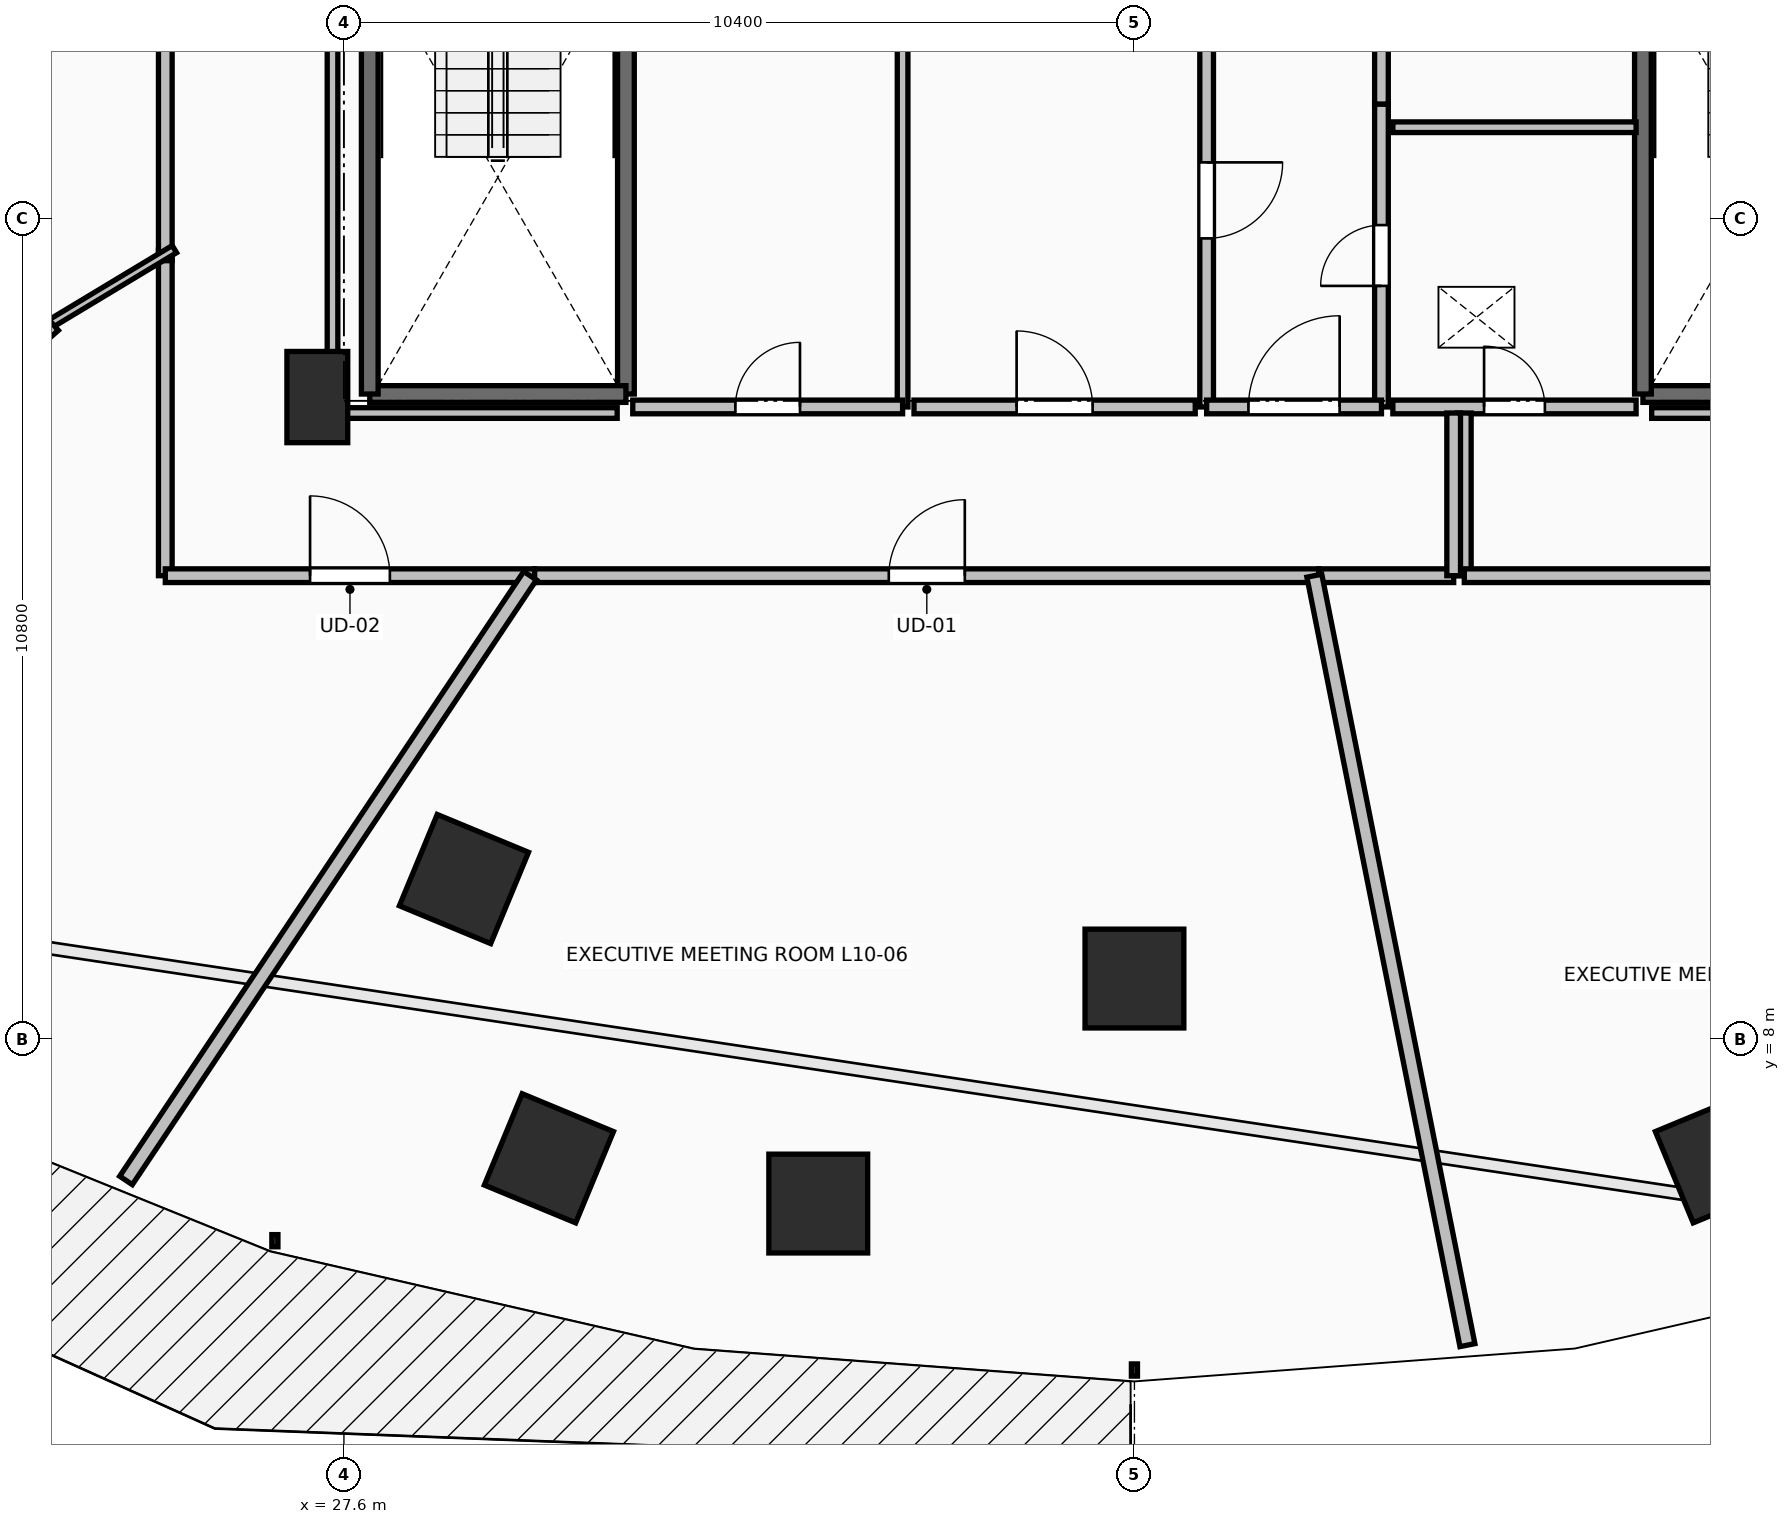
"""IFC4 building model, lengths in metres.
Left out: names, types, materials, properties, quantities, classifications, styles, units other than length and angle.
Written with IfcOpenShell. Run it as: python <this file> out.ifc"""

import sys

from ifc_helpers import new_model, si_unit, direction, frame, frame_2d, origin, origin_2d, place, context, subcontext, project, spatial, rectangle, extrude, element, fill, save


model = new_model("IFC4")
c1 = context("Model", 3, precision=1e-05, world=origin(), true_north=direction((0.0, 1.0)))
c2 = subcontext(c1, "Body", "Model", "MODEL_VIEW")
j1 = project(units=[si_unit("LENGTHUNIT", "METRE"), si_unit("PLANEANGLEUNIT", "RADIAN")], contexts=[c1])
p1 = place(None, origin())
s1 = spatial("IfcSite", under=j1, at=p1, CompositionType="ELEMENT")
p2 = place(p1, origin())
s2 = spatial("IfcBuilding", under=s1, at=p2, CompositionType="ELEMENT")
p3 = place(p2, frame((0.0, 0.0, 41.5)))
s3 = spatial("IfcBuildingStorey", under=s2, at=p3, CompositionType="ELEMENT", Elevation=41.5)
for number, where, z_axis, x_axis in (
    (1, (29.179, 10.109, 0.0), (0.0, 0.0, 1.0), (-0.383, -0.924, 0.0)),
    (2, (38.0, 8.8, 0.0), (0.0, 0.0, 1.0), (0.0, -1.0, 0.0)),
    (3, (30.297, 6.435, 0.0), (0.0, 0.0, 1.0), (-0.383, -0.924, 0.0)),
    (4, (33.84, 5.84, 0.0), (0.0, 0.0, 1.0), (0.0, -1.0, 0.0)),
    (5, (45.703, 6.435, 0.0), (0.0, 0.0, 1.0), (0.383, -0.924, 0.0)),
):
    element("IfcColumn", number, at=place(p3, frame(where, z_axis=z_axis, x_axis=x_axis)), inside=s3, PredefinedType="COLUMN", context=c2, shape_type="SweptSolid", body=[
        extrude(rectangle(XDim=1.3, YDim=1.3, at=origin_2d()), origin(), (0.0, 0.0, 1.0), 3.5),
    ])
p4 = place(p3, frame((27.25, 16.45, 0.0), z_axis=(0.0, 0.0, 1.0), x_axis=(1.0, 0.0, 0.0)))
e6 = element("IfcColumn", 6, at=p4, inside=s3, PredefinedType="PILASTER", context=c2, shape_type="SweptSolid", body=[
    extrude(rectangle(XDim=0.8, YDim=1.2, at=origin_2d()), origin(), (0.0, 0.0, 1.0), 3.5),
])
p5 = place(p3, frame((31.31, 23.91, 0.0), z_axis=(0.0, 0.0, 1.0), x_axis=(0.0, -1.0, 0.0)))
e7 = element("IfcWall", 7, at=p5, inside=s3, PredefinedType="SOLIDWALL", context=c2, shape_type="SweptSolid", body=[
    extrude(rectangle(XDim=7.42, YDim=0.22, at=frame_2d((3.71, 0.0))), origin(), (0.0, 0.0, 1.0), 3.24),
])
p6 = place(p3, frame((31.31, 16.49, 0.0), z_axis=(0.0, 0.0, 1.0), x_axis=(-1.0, 0.0, 0.0)))
e8 = element("IfcWall", 8, at=p6, inside=s3, PredefinedType="SOLIDWALL", context=c2, shape_type="SweptSolid", body=[
    extrude(rectangle(XDim=3.37, YDim=0.22, at=frame_2d((1.685, 0.0))), origin(), (0.0, 0.0, 1.0), 3.24),
])
p7 = place(p3, frame((27.94, 16.49, 0.0), z_axis=(0.0, 0.0, 1.0), x_axis=(0.0, 1.0, 0.0)))
e9 = element("IfcWall", 9, at=p7, inside=s3, PredefinedType="SOLIDWALL", context=c2, shape_type="SweptSolid", body=[
    extrude(rectangle(XDim=7.42, YDim=0.22, at=frame_2d((3.71, 0.0))), origin(), (0.0, 0.0, 1.0), 3.24),
])
p8 = place(p3, frame((48.06, 16.49, 0.0), z_axis=(0.0, 0.0, 1.0), x_axis=(-1.0, 0.0, 0.0)))
e10 = element("IfcWall", 10, at=p8, inside=s3, PredefinedType="SOLIDWALL", context=c2, shape_type="SweptSolid", body=[
    extrude(rectangle(XDim=3.37, YDim=0.22, at=frame_2d((1.685, 0.0))), origin(), (0.0, 0.0, 1.0), 3.24),
])
p9 = place(p3, frame((44.69, 16.49, 0.0), z_axis=(0.0, 0.0, 1.0), x_axis=(0.0, 1.0, 0.0)))
e11 = element("IfcWall", 11, at=p9, inside=s3, PredefinedType="SOLIDWALL", context=c2, shape_type="SweptSolid", body=[
    extrude(rectangle(XDim=7.42, YDim=0.22, at=frame_2d((3.71, 0.0))), origin(), (0.0, 0.0, 1.0), 3.24),
])
p10 = place(p3, frame((41.25, 16.32, 0.0), z_axis=(0.0, 0.0, 1.0), x_axis=(0.0, 1.0, 0.0)))
e12 = element("IfcWall", 12, at=p10, inside=s3, PredefinedType="PARTITIONING", context=c2, shape_type="SweptSolid", body=[
    extrude(rectangle(XDim=3.985, YDim=0.18, at=frame_2d((1.992, 0.0))), origin(), (0.0, 0.0, 1.0), 3.24),
])
p11 = place(p10, frame((1.593, 0.0, 0.0)))
e13 = element("IfcOpeningElement", 13, at=p11, cuts=e12, PredefinedType="OPENING", context=c2, shape_type="SweptSolid", body=[
    extrude(rectangle(XDim=0.8, YDim=2.05, at=frame_2d((0.4, 1.025))), frame((0.0, 0.105, 0.0), z_axis=(0.0, -1.0, 0.0), x_axis=(1.0, 0.0, 0.0)), (0.0, 0.0, 1.0), 0.21),
])
p12 = place(p3, frame((41.25, 20.305, 0.0), z_axis=(0.0, 0.0, 1.0), x_axis=(0.0, 1.0, 0.0)))
e14 = element("IfcWall", 14, at=p12, inside=s3, PredefinedType="PARTITIONING", context=c2, shape_type="SweptSolid", body=[
    extrude(rectangle(XDim=3.895, YDim=0.18, at=frame_2d((1.948, 0.0))), origin(), (0.0, 0.0, 1.0), 3.24),
])
p13 = place(p12, frame((1.448, 0.0, 0.0)))
e15 = element("IfcOpeningElement", 15, at=p13, cuts=e14, PredefinedType="OPENING", context=c2, shape_type="SweptSolid", body=[
    extrude(rectangle(XDim=1.0, YDim=2.15, at=frame_2d((0.5, 1.075))), frame((0.0, 0.105, 0.0), z_axis=(0.0, -1.0, 0.0), x_axis=(1.0, 0.0, 0.0)), (0.0, 0.0, 1.0), 0.21),
])
p14 = place(p3, frame((38.95, 21.755, 0.0), z_axis=(0.0, 0.0, 1.0), x_axis=(0.0, -1.0, 0.0)))
e16 = element("IfcWall", 16, at=p14, inside=s3, PredefinedType="PARTITIONING", context=c2, shape_type="SweptSolid", body=[
    extrude(rectangle(XDim=5.435, YDim=0.18, at=frame_2d((2.717, 0.0))), origin(), (0.0, 0.0, 1.0), 3.24),
])
p15 = place(p14, frame((2.218, 0.0, 0.0)))
e17 = element("IfcOpeningElement", 17, at=p15, cuts=e16, PredefinedType="OPENING", context=c2, shape_type="SweptSolid", body=[
    extrude(rectangle(XDim=1.0, YDim=2.15, at=frame_2d((0.5, 1.075))), frame((0.0, 0.105, 0.0), z_axis=(0.0, -1.0, 0.0), x_axis=(1.0, 0.0, 0.0)), (0.0, 0.0, 1.0), 0.21),
])
p16 = place(p3, frame((38.95, 16.32, 0.0), z_axis=(0.0, 0.0, 1.0), x_axis=(1.0, 0.0, 0.0)))
e18 = element("IfcWall", 18, at=p16, inside=s3, PredefinedType="PARTITIONING", context=c2, shape_type="SweptSolid", body=[
    extrude(rectangle(XDim=2.3, YDim=0.18, at=frame_2d((1.15, 0.0))), origin(), (0.0, 0.0, 1.0), 3.24),
])
p17 = place(p16, frame((0.55, 0.0, 0.0)))
e19 = element("IfcOpeningElement", 19, at=p17, cuts=e18, PredefinedType="OPENING", context=c2, shape_type="SweptSolid", body=[
    extrude(rectangle(XDim=1.2, YDim=2.15, at=frame_2d((0.6, 1.075))), frame((0.0, 0.105, 0.0), z_axis=(0.0, -1.0, 0.0), x_axis=(1.0, 0.0, 0.0)), (0.0, 0.0, 1.0), 0.21),
])
p18 = place(p3, frame((44.6, 20.0, 0.0), z_axis=(0.0, 0.0, 1.0), x_axis=(-1.0, 0.0, 0.0)))
e20 = element("IfcWall", 20, at=p18, inside=s3, PredefinedType="PARTITIONING", context=c2, shape_type="SweptSolid", body=[
    extrude(rectangle(XDim=3.2, YDim=0.14, at=frame_2d((1.6, 0.0))), origin(), (0.0, 0.0, 1.0), 3.24),
])
p19 = place(p3, frame((41.4, 16.32, 0.0), z_axis=(0.0, 0.0, 1.0), x_axis=(1.0, 0.0, 0.0)))
e21 = element("IfcWall", 21, at=p19, inside=s3, PredefinedType="PARTITIONING", context=c2, shape_type="SweptSolid", body=[
    extrude(rectangle(XDim=3.2, YDim=0.18, at=frame_2d((1.6, 0.0))), origin(), (0.0, 0.0, 1.0), 3.24),
])
p20 = place(p19, frame((1.2, 0.0, 0.0)))
e22 = element("IfcOpeningElement", 22, at=p20, cuts=e21, PredefinedType="OPENING", context=c2, shape_type="SweptSolid", body=[
    extrude(rectangle(XDim=0.8, YDim=2.05, at=frame_2d((0.4, 1.025))), frame((0.0, 0.105, 0.0), z_axis=(0.0, -1.0, 0.0), x_axis=(1.0, 0.0, 0.0)), (0.0, 0.0, 1.0), 0.21),
])
p21 = place(p3, frame((34.95, 16.32, 0.0), z_axis=(0.0, 0.0, 1.0), x_axis=(0.0, 1.0, 0.0)))
e23 = element("IfcWall", 23, at=p21, inside=s3, PredefinedType="PARTITIONING", context=c2, shape_type="SweptSolid", body=[
    extrude(rectangle(XDim=5.13, YDim=0.14, at=frame_2d((2.565, 0.0))), origin(), (0.0, 0.0, 1.0), 3.24),
])
p22 = place(p3, frame((31.4, 16.32, 0.0), z_axis=(0.0, 0.0, 1.0), x_axis=(1.0, 0.0, 0.0)))
e24 = element("IfcWall", 24, at=p22, inside=s3, PredefinedType="PARTITIONING", context=c2, shape_type="SweptSolid", body=[
    extrude(rectangle(XDim=3.55, YDim=0.18, at=frame_2d((1.775, 0.0))), origin(), (0.0, 0.0, 1.0), 3.24),
])
p23 = place(p22, frame((1.35, 0.0, 0.0)))
e25 = element("IfcOpeningElement", 25, at=p23, cuts=e24, PredefinedType="OPENING", context=c2, shape_type="SweptSolid", body=[
    extrude(rectangle(XDim=0.85, YDim=2.1, at=frame_2d((0.425, 1.05))), frame((0.0, 0.105, 0.0), z_axis=(0.0, -1.0, 0.0), x_axis=(1.0, 0.0, 0.0)), (0.0, 0.0, 1.0), 0.21),
])
p24 = place(p3, frame((35.1, 16.32, 0.0), z_axis=(0.0, 0.0, 1.0), x_axis=(1.0, 0.0, 0.0)))
e26 = element("IfcWall", 26, at=p24, inside=s3, PredefinedType="PARTITIONING", context=c2, shape_type="SweptSolid", body=[
    extrude(rectangle(XDim=3.7, YDim=0.18, at=frame_2d((1.85, 0.0))), origin(), (0.0, 0.0, 1.0), 3.24),
])
p25 = place(p24, frame((1.35, 0.0, 0.0)))
e27 = element("IfcOpeningElement", 27, at=p25, cuts=e26, PredefinedType="OPENING", context=c2, shape_type="SweptSolid", body=[
    extrude(rectangle(XDim=1.0, YDim=2.15, at=frame_2d((0.5, 1.075))), frame((0.0, 0.105, 0.0), z_axis=(0.0, -1.0, 0.0), x_axis=(1.0, 0.0, 0.0)), (0.0, 0.0, 1.0), 0.21),
])
p26 = place(p3, frame((25.25, 18.384, 0.0), z_axis=(0.0, 0.0, 1.0), x_axis=(0.0, -1.0, 0.0)))
e28 = element("IfcWall", 28, at=p26, inside=s3, PredefinedType="PARTITIONING", context=c2, shape_type="SweptSolid", body=[
    extrude(rectangle(XDim=4.284, YDim=0.18, at=frame_2d((2.142, 0.0))), origin(), (0.0, 0.0, 1.0), 2.432),
])
p27 = place(p3, frame((25.25, 14.1, 0.0), z_axis=(0.0, 0.0, 1.0), x_axis=(1.0, 0.0, 0.0)))
e29 = element("IfcWall", 29, at=p27, inside=s3, PredefinedType="PARTITIONING", context=c2, shape_type="SweptSolid", body=[
    extrude(rectangle(XDim=4.859, YDim=0.18, at=frame_2d((2.429, 0.0))), origin(), (0.0, 0.0, 1.0), 2.432),
])
p28 = place(p27, frame((1.905, 0.0, 0.0)))
e30 = element("IfcOpeningElement", 30, at=p28, cuts=e29, PredefinedType="OPENING", context=c2, shape_type="SweptSolid", body=[
    extrude(rectangle(XDim=1.05, YDim=2.2, at=frame_2d((0.525, 1.1))), frame((0.0, 0.105, 0.0), z_axis=(0.0, -1.0, 0.0), x_axis=(1.0, 0.0, 0.0)), (0.0, 0.0, 1.0), 0.21),
])
p29 = place(p3, frame((25.25, 23.543, 0.0), z_axis=(0.0, 0.0, 1.0), x_axis=(0.0, -1.0, 0.0)))
e31 = element("IfcWall", 31, at=p29, inside=s3, PredefinedType="PARTITIONING", context=c2, shape_type="SweptSolid", body=[
    extrude(rectangle(XDim=5.299, YDim=0.18, at=frame_2d((2.649, 0.0))), origin(), (0.0, 0.0, 1.0), 3.24),
])
p30 = place(p3, frame((30.109, 14.1, 0.0), z_axis=(0.0, 0.0, 1.0), x_axis=(1.0, 0.0, 0.0)))
e32 = element("IfcWall", 32, at=p30, inside=s3, PredefinedType="PARTITIONING", context=c2, shape_type="SweptSolid", body=[
    extrude(rectangle(XDim=10.319, YDim=0.18, at=frame_2d((5.16, 0.0))), origin(), (0.0, 0.0, 1.0), 3.24),
])
p31 = place(p30, frame((4.659, 0.0, 0.0)))
e33 = element("IfcOpeningElement", 33, at=p31, cuts=e32, PredefinedType="OPENING", context=c2, shape_type="SweptSolid", body=[
    extrude(rectangle(XDim=1.0, YDim=2.15, at=frame_2d((0.5, 1.075))), frame((0.0, 0.105, 0.0), z_axis=(0.0, -1.0, 0.0), x_axis=(1.0, 0.0, 0.0)), (0.0, 0.0, 1.0), 0.21),
])
p32 = place(p3, frame((42.34, 16.24, 0.0), z_axis=(0.0, 0.0, 1.0), x_axis=(0.0, -1.0, 0.0)))
e34 = element("IfcWall", 34, at=p32, inside=s3, PredefinedType="PARTITIONING", context=c2, shape_type="SweptSolid", body=[
    extrude(rectangle(XDim=2.14, YDim=0.18, at=frame_2d((1.07, 0.0))), origin(), (0.0, 0.0, 1.0), 3.24),
])
p33 = place(p3, frame((42.34, 14.1, 0.0), z_axis=(0.0, 0.0, 1.0), x_axis=(1.0, 0.0, 0.0)))
e35 = element("IfcWall", 35, at=p33, inside=s3, PredefinedType="PARTITIONING", context=c2, shape_type="SweptSolid", body=[
    extrude(rectangle(XDim=8.41, YDim=0.18, at=frame_2d((4.205, 0.0))), origin(), (0.0, 0.0, 1.0), 2.432),
])
p34 = place(p33, frame((3.705, 0.0, 0.0)))
e36 = element("IfcOpeningElement", 36, at=p34, cuts=e35, PredefinedType="OPENING", context=c2, shape_type="SweptSolid", body=[
    extrude(rectangle(XDim=1.0, YDim=2.15, at=frame_2d((0.5, 1.075))), frame((0.0, 0.105, 0.0), z_axis=(0.0, -1.0, 0.0), x_axis=(1.0, 0.0, 0.0)), (0.0, 0.0, 1.0), 0.21),
])
p35 = place(p3, frame((40.428, 14.1, 0.0), z_axis=(0.0, 0.0, 1.0), x_axis=(1.0, 0.0, 0.0)))
e37 = element("IfcWall", 37, at=p35, inside=s3, PredefinedType="PARTITIONING", context=c2, shape_type="SweptSolid", body=[
    extrude(rectangle(XDim=1.772, YDim=0.18, at=frame_2d((0.886, 0.0))), origin(), (0.0, 0.0, 1.0), 3.24),
])
p36 = place(p3, frame((42.2, 14.1, 0.0), z_axis=(0.0, 0.0, 1.0), x_axis=(0.0, 1.0, 0.0)))
e38 = element("IfcWall", 38, at=p36, inside=s3, PredefinedType="PARTITIONING", context=c2, shape_type="SweptSolid", body=[
    extrude(rectangle(XDim=2.14, YDim=0.18, at=frame_2d((1.07, 0.0))), origin(), (0.0, 0.0, 1.0), 3.24),
])
p37 = place(p3, frame((25.37, 18.396, 0.0), z_axis=(0.0, 0.0, 1.0), x_axis=(-0.856631627837, -0.515928535932, 0.0)))
e39 = element("IfcWall", 39, at=p37, inside=s3, PredefinedType="PARTITIONING", context=c2, shape_type="SweptSolid", body=[
    extrude(rectangle(XDim=2.079, YDim=0.11, at=frame_2d((1.04, 0.0))), origin(), (0.0, 0.0, 1.0), 2.432),
])
p38 = place(p3, frame((23.802, 17.291, 0.0), z_axis=(0.0, 0.0, 1.0), x_axis=(-0.662071486681, 0.74944068913, 0.0)))
e40 = element("IfcWall", 40, at=p38, inside=s3, PredefinedType="PARTITIONING", context=c2, shape_type="SweptSolid", body=[
    extrude(rectangle(XDim=4.594, YDim=0.11, at=frame_2d((2.297, 0.0))), origin(), (0.0, 0.0, 1.0), 2.432),
])
p39 = place(p38, frame((1.872, 0.0, 0.0)))
e41 = element("IfcOpeningElement", 41, at=p39, cuts=e40, PredefinedType="OPENING", context=c2, shape_type="SweptSolid", body=[
    extrude(rectangle(XDim=0.85, YDim=2.1, at=frame_2d((0.425, 1.05))), frame((0.0, 0.07, 0.0), z_axis=(0.0, -1.0, 0.0), x_axis=(1.0, 0.0, 0.0)), (0.0, 0.0, 1.0), 0.14),
])
p40 = place(p3, frame((24.733, 6.144, 0.0), z_axis=(0.0, 0.0, 1.0), x_axis=(0.555577192504, 0.831464962082, 0.0)))
e42 = element("IfcWall", 42, at=p40, inside=s3, PredefinedType="PARTITIONING", context=c2, shape_type="SweptSolid", body=[
    extrude(rectangle(XDim=9.569, YDim=0.2, at=frame_2d((4.784, 0.0))), origin(), (0.0, 0.0, 1.0), 2.432),
])
p41 = place(p3, frame((42.381, 3.977, 0.0), z_axis=(0.0, 0.0, 1.0), x_axis=(-0.195142599893, 0.980774880239, 0.0)))
e43 = element("IfcWall", 43, at=p41, inside=s3, PredefinedType="PARTITIONING", context=c2, shape_type="SweptSolid", body=[
    extrude(rectangle(XDim=10.322, YDim=0.2, at=frame_2d((5.161, 0.0))), origin(), (0.0, 0.0, 1.0), 2.432),
])
for number, where, z_axis, x_axis in (
    (44, (48.55, 16.24, 0.0), (0.0, 0.0, 1.0), (-1.0, 0.0, 0.0)),
    (45, (31.195, 16.24, 0.0), (0.0, 0.0, 1.0), (-1.0, 0.0, 0.0)),
):
    element("IfcWall", number, at=place(p3, frame(where, z_axis=z_axis, x_axis=x_axis)), inside=s3, PredefinedType="PARTITIONING", context=c2, shape_type="SweptSolid", body=[
        extrude(rectangle(XDim=3.745, YDim=0.14, at=frame_2d((1.873, 0.0))), origin(), (0.0, 0.0, 1.0), 2.432),
    ])
p42 = place(p3, frame((27.45, 16.24, 0.0), z_axis=(0.0, 0.0, 1.0), x_axis=(0.0, 1.0, 0.0)))
e46 = element("IfcWall", 46, at=p42, inside=s3, PredefinedType="PARTITIONING", context=c2, shape_type="SweptSolid", body=[
    extrude(rectangle(XDim=7.514, YDim=0.14, at=frame_2d((3.757, 0.0))), origin(), (0.0, 0.0, 1.0), 2.432),
])
p43 = place(p11, origin())
e47 = element("IfcDoor", 47, at=p43, inside=s3, OperationType="SINGLE_SWING_LEFT", PredefinedType="DOOR", context=c2, shape_type="SweptSolid", body=[
    extrude(rectangle(XDim=0.8, YDim=2.05, at=frame_2d((0.4, 1.025))), frame((0.0, 0.025, 0.0), z_axis=(0.0, -1.0, 0.0), x_axis=(1.0, 0.0, 0.0)), (0.0, 0.0, 1.0), 0.05),
])
fill(e13, e47)
p44 = place(p15, origin())
e48 = element("IfcDoor", 48, at=p44, inside=s3, OperationType="SINGLE_SWING_LEFT", PredefinedType="DOOR", context=c2, shape_type="SweptSolid", body=[
    extrude(rectangle(XDim=1.0, YDim=2.15, at=frame_2d((0.5, 1.075))), frame((0.0, 0.025, 0.0), z_axis=(0.0, -1.0, 0.0), x_axis=(1.0, 0.0, 0.0)), (0.0, 0.0, 1.0), 0.05),
])
fill(e17, e48)
p45 = place(p17, origin())
e49 = element("IfcDoor", 49, at=p45, inside=s3, OperationType="SINGLE_SWING_RIGHT", PredefinedType="DOOR", context=c2, shape_type="SweptSolid", body=[
    extrude(rectangle(XDim=1.2, YDim=2.15, at=frame_2d((0.6, 1.075))), frame((0.0, 0.025, 0.0), z_axis=(0.0, -1.0, 0.0), x_axis=(1.0, 0.0, 0.0)), (0.0, 0.0, 1.0), 0.05),
])
fill(e19, e49)
p46 = place(p20, origin())
e50 = element("IfcDoor", 50, at=p46, inside=s3, OperationType="SINGLE_SWING_LEFT", PredefinedType="DOOR", context=c2, shape_type="SweptSolid", body=[
    extrude(rectangle(XDim=0.8, YDim=2.05, at=frame_2d((0.4, 1.025))), frame((0.0, 0.025, 0.0), z_axis=(0.0, -1.0, 0.0), x_axis=(1.0, 0.0, 0.0)), (0.0, 0.0, 1.0), 0.05),
])
fill(e22, e50)
p47 = place(p23, origin())
e51 = element("IfcDoor", 51, at=p47, inside=s3, OperationType="SINGLE_SWING_RIGHT", PredefinedType="DOOR", context=c2, shape_type="SweptSolid", body=[
    extrude(rectangle(XDim=0.85, YDim=2.1, at=frame_2d((0.425, 1.05))), frame((0.0, 0.025, 0.0), z_axis=(0.0, -1.0, 0.0), x_axis=(1.0, 0.0, 0.0)), (0.0, 0.0, 1.0), 0.05),
])
fill(e25, e51)
p48 = place(p25, origin())
e52 = element("IfcDoor", 52, at=p48, inside=s3, OperationType="SINGLE_SWING_LEFT", PredefinedType="DOOR", context=c2, shape_type="SweptSolid", body=[
    extrude(rectangle(XDim=1.0, YDim=2.15, at=frame_2d((0.5, 1.075))), frame((0.0, 0.025, 0.0), z_axis=(0.0, -1.0, 0.0), x_axis=(1.0, 0.0, 0.0)), (0.0, 0.0, 1.0), 0.05),
])
fill(e27, e52)
p49 = place(p28, origin())
e53 = element("IfcDoor", 53, at=p49, inside=s3, OperationType="SINGLE_SWING_LEFT", PredefinedType="DOOR", context=c2, shape_type="SweptSolid", body=[
    extrude(rectangle(XDim=1.05, YDim=2.2, at=frame_2d((0.525, 1.1))), frame((0.0, 0.025, 0.0), z_axis=(0.0, -1.0, 0.0), x_axis=(1.0, 0.0, 0.0)), (0.0, 0.0, 1.0), 0.05),
])
fill(e30, e53)
p50 = place(p31, origin())
e54 = element("IfcDoor", 54, at=p50, inside=s3, OperationType="SINGLE_SWING_RIGHT", PredefinedType="DOOR", context=c2, shape_type="SweptSolid", body=[
    extrude(rectangle(XDim=1.0, YDim=2.15, at=frame_2d((0.5, 1.075))), frame((0.0, 0.025, 0.0), z_axis=(0.0, -1.0, 0.0), x_axis=(1.0, 0.0, 0.0)), (0.0, 0.0, 1.0), 0.05),
])
fill(e33, e54)
save(model, sys.argv[1])
